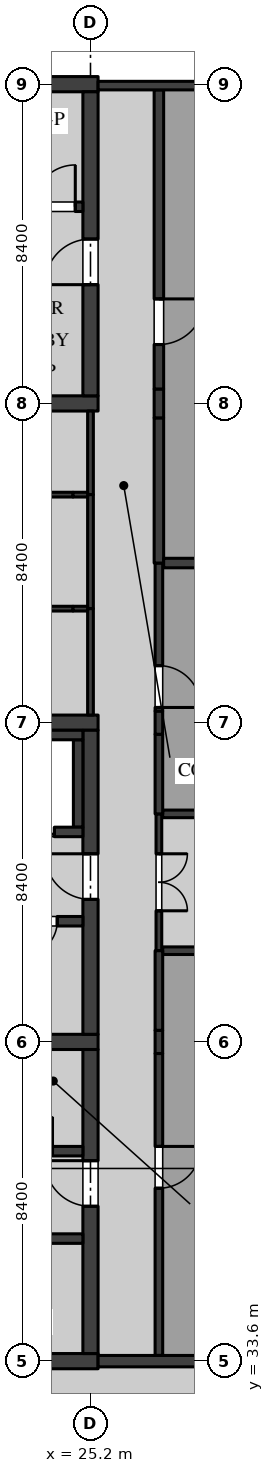
"""IFC4 building model, lengths in metres.
Left out: names, types, materials, properties, quantities, classifications, styles, units other than length and angle.
Written with IfcOpenShell. Run it as: python <this file> out.ifc"""

import sys

from ifc_helpers import new_model, si_unit, direction, frame, frame_2d, origin, place, context, subcontext, project, spatial, rectangle, extrude, element, fill, save


model = new_model("IFC4")
c1 = context("Model", 3, precision=1e-05, world=origin(), true_north=direction((0.0, 1.0)))
c2 = subcontext(c1, "Body", "Model", "MODEL_VIEW")
j1 = project(units=[si_unit("LENGTHUNIT", "METRE"), si_unit("PLANEANGLEUNIT", "RADIAN")], contexts=[c1])
p1 = place(None, origin())
s1 = spatial("IfcSite", under=j1, at=p1, CompositionType="ELEMENT")
p2 = place(p1, origin())
s2 = spatial("IfcBuilding", under=s1, at=p2, CompositionType="ELEMENT")
p3 = place(p2, frame((0.0, 0.0, 5.4)))
s3 = spatial("IfcBuildingStorey", under=s2, at=p3, CompositionType="ELEMENT", Elevation=5.4)
p4 = place(p3, frame((16.6, 42.0, 0.0), z_axis=(0.0, 0.0, 1.0), x_axis=(1.0, 0.0, 0.0)))
e1 = element("IfcWall", 1, at=p4, inside=s3, PredefinedType="SHEAR", context=c2, shape_type="SweptSolid", body=[
    extrude(rectangle(XDim=8.8, YDim=0.4, at=frame_2d((4.4, 0.0))), origin(), (0.0, 0.0, 1.0), 4.37),
])
p5 = place(p4, frame((1.05, 0.0, 0.0)))
e2 = element("IfcOpeningElement", 2, at=p5, cuts=e1, PredefinedType="OPENING", context=c2, shape_type="SweptSolid", body=[
    extrude(rectangle(XDim=1.1, YDim=2.1, at=frame_2d((0.55, 1.05))), frame((0.0, 0.21, 0.0), z_axis=(0.0, -1.0, 0.0), x_axis=(1.0, 0.0, 0.0)), (0.0, 0.0, 1.0), 0.42),
])
p6 = place(p3, frame((16.6, 50.4, 0.0), z_axis=(0.0, 0.0, 1.0), x_axis=(1.0, 0.0, 0.0)))
e3 = element("IfcWall", 3, at=p6, inside=s3, PredefinedType="SHEAR", context=c2, shape_type="SweptSolid", body=[
    extrude(rectangle(XDim=8.8, YDim=0.4, at=frame_2d((4.4, 0.0))), origin(), (0.0, 0.0, 1.0), 4.37),
])
p7 = place(p3, frame((25.2, 42.2, 0.0), z_axis=(0.0, 0.0, 1.0), x_axis=(0.0, 1.0, 0.0)))
e4 = element("IfcWall", 4, at=p7, inside=s3, PredefinedType="SHEAR", context=c2, shape_type="SweptSolid", body=[
    extrude(rectangle(XDim=8.0, YDim=0.4, at=frame_2d((4.0, 0.0))), origin(), (0.0, 0.0, 1.0), 4.37),
])
p8 = place(p7, frame((3.55, 0.0, 0.0)))
e5 = element("IfcOpeningElement", 5, at=p8, cuts=e4, PredefinedType="OPENING", context=c2, shape_type="SweptSolid", body=[
    extrude(rectangle(XDim=1.2, YDim=2.1, at=frame_2d((0.6, 1.05))), frame((0.0, 0.21, 0.0), z_axis=(0.0, -1.0, 0.0), x_axis=(1.0, 0.0, 0.0)), (0.0, 0.0, 1.0), 0.42),
])
p9 = place(p3, frame((25.0, 45.175, 0.0), z_axis=(0.0, 0.0, 1.0), x_axis=(-1.0, 0.0, 0.0)))
e6 = element("IfcWall", 6, at=p9, inside=s3, PredefinedType="SOLIDWALL", context=c2, shape_type="SweptSolid", body=[
    extrude(rectangle(XDim=2.25, YDim=0.25, at=frame_2d((1.125, 0.0))), origin(), (0.0, 0.0, 1.0), 4.37),
])
p10 = place(p9, frame((0.675, 0.0, 0.0)))
e7 = element("IfcOpeningElement", 7, at=p10, cuts=e6, PredefinedType="OPENING", context=c2, shape_type="SweptSolid", body=[
    extrude(rectangle(XDim=0.9, YDim=2.1, at=frame_2d((0.45, 1.05))), frame((0.0, 0.135, 0.0), z_axis=(0.0, -1.0, 0.0), x_axis=(1.0, 0.0, 0.0)), (0.0, 0.0, 1.0), 0.27),
])
for number, where, z_axis, x_axis in (
    (8, (16.6, 58.8, 0.0), (0.0, 0.0, 1.0), (1.0, 0.0, 0.0)),
    (9, (16.6, 67.2, 0.0), (0.0, 0.0, 1.0), (1.0, 0.0, 0.0)),
):
    element("IfcWall", number, at=place(p3, frame(where, z_axis=z_axis, x_axis=x_axis)), inside=s3, PredefinedType="SHEAR", context=c2, shape_type="SweptSolid", body=[
        extrude(rectangle(XDim=8.8, YDim=0.4, at=frame_2d((4.4, 0.0))), origin(), (0.0, 0.0, 1.0), 4.37),
    ])
p11 = place(p3, frame((25.2, 59.0, 0.0), z_axis=(0.0, 0.0, 1.0), x_axis=(0.0, 1.0, 0.0)))
e10 = element("IfcWall", 10, at=p11, inside=s3, PredefinedType="SHEAR", context=c2, shape_type="SweptSolid", body=[
    extrude(rectangle(XDim=8.0, YDim=0.4, at=frame_2d((4.0, 0.0))), origin(), (0.0, 0.0, 1.0), 4.37),
])
p12 = place(p11, frame((2.925, 0.0, 0.0)))
e11 = element("IfcOpeningElement", 11, at=p12, cuts=e10, PredefinedType="OPENING", context=c2, shape_type="SweptSolid", body=[
    extrude(rectangle(XDim=1.2, YDim=2.1, at=frame_2d((0.6, 1.05))), frame((0.0, 0.21, 0.0), z_axis=(0.0, -1.0, 0.0), x_axis=(1.0, 0.0, 0.0)), (0.0, 0.0, 1.0), 0.42),
])
p13 = place(p3, frame((25.0, 63.975, 0.0), z_axis=(0.0, 0.0, 1.0), x_axis=(-1.0, 0.0, 0.0)))
e12 = element("IfcWall", 12, at=p13, inside=s3, PredefinedType="SOLIDWALL", context=c2, shape_type="SweptSolid", body=[
    extrude(rectangle(XDim=8.0, YDim=0.25, at=frame_2d((4.0, 0.0))), origin(), (0.0, 0.0, 1.0), 4.37),
])
p14 = place(p13, frame((0.2, 0.0, 0.0)))
e13 = element("IfcOpeningElement", 13, at=p14, cuts=e12, PredefinedType="OPENING", context=c2, shape_type="SweptSolid", body=[
    extrude(rectangle(XDim=1.1, YDim=2.1, at=frame_2d((0.55, 1.05))), frame((0.0, 0.135, 0.0), z_axis=(0.0, -1.0, 0.0), x_axis=(1.0, 0.0, 0.0)), (0.0, 0.0, 1.0), 0.27),
])
p15 = place(p3, frame((16.6, 33.6, 0.0), z_axis=(0.0, 0.0, 1.0), x_axis=(1.0, 0.0, 0.0)))
e14 = element("IfcWall", 14, at=p15, inside=s3, PredefinedType="SHEAR", context=c2, shape_type="SweptSolid", body=[
    extrude(rectangle(XDim=8.8, YDim=0.4, at=frame_2d((4.4, 0.0))), origin(), (0.0, 0.0, 1.0), 4.37),
])
p16 = place(p3, frame((25.2, 33.8, 0.0), z_axis=(0.0, 0.0, 1.0), x_axis=(0.0, 1.0, 0.0)))
e15 = element("IfcWall", 15, at=p16, inside=s3, PredefinedType="SHEAR", context=c2, shape_type="SweptSolid", body=[
    extrude(rectangle(XDim=8.0, YDim=0.4, at=frame_2d((4.0, 0.0))), origin(), (0.0, 0.0, 1.0), 4.37),
])
p17 = place(p16, frame((3.875, 0.0, 0.0)))
e16 = element("IfcOpeningElement", 16, at=p17, cuts=e15, PredefinedType="OPENING", context=c2, shape_type="SweptSolid", body=[
    extrude(rectangle(XDim=1.2, YDim=2.1, at=frame_2d((0.6, 1.05))), frame((0.0, 0.21, 0.0), z_axis=(0.0, -1.0, 0.0), x_axis=(1.0, 0.0, 0.0)), (0.0, 0.0, 1.0), 0.42),
])
p18 = place(p3, frame((17.0, 36.825, 0.0), z_axis=(0.0, 0.0, 1.0), x_axis=(1.0, 0.0, 0.0)))
e17 = element("IfcWall", 17, at=p18, inside=s3, PredefinedType="SOLIDWALL", context=c2, shape_type="SweptSolid", body=[
    extrude(rectangle(XDim=8.0, YDim=0.25, at=frame_2d((4.0, 0.0))), origin(), (0.0, 0.0, 1.0), 4.37),
])
p19 = place(p18, frame((0.2, 0.0, 0.0)))
e18 = element("IfcOpeningElement", 18, at=p19, cuts=e17, PredefinedType="OPENING", context=c2, shape_type="SweptSolid", body=[
    extrude(rectangle(XDim=1.1, YDim=2.1, at=frame_2d((0.55, 1.05))), frame((0.0, 0.135, 0.0), z_axis=(0.0, -1.0, 0.0), x_axis=(1.0, 0.0, 0.0)), (0.0, 0.0, 1.0), 0.27),
])
p20 = place(p3, frame((19.65, 39.125, 0.0), z_axis=(0.0, 0.0, 1.0), x_axis=(1.0, 0.0, 0.0)))
e19 = element("IfcWall", 19, at=p20, inside=s3, PredefinedType="SOLIDWALL", context=c2, shape_type="SweptSolid", body=[
    extrude(rectangle(XDim=5.35, YDim=0.25, at=frame_2d((2.675, 0.0))), origin(), (0.0, 0.0, 1.0), 4.37),
])
p21 = place(p20, frame((3.65, 0.0, 0.0)))
e20 = element("IfcOpeningElement", 20, at=p21, cuts=e19, PredefinedType="OPENING", context=c2, shape_type="SweptSolid", body=[
    extrude(rectangle(XDim=0.9, YDim=2.1, at=frame_2d((0.45, 1.05))), frame((0.0, 0.135, 0.0), z_axis=(0.0, -1.0, 0.0), x_axis=(1.0, 0.0, 0.0)), (0.0, 0.0, 1.0), 0.27),
])
p22 = place(p20, frame((0.9, 0.0, 0.0)))
e21 = element("IfcOpeningElement", 21, at=p22, cuts=e19, PredefinedType="OPENING", context=c2, shape_type="SweptSolid", body=[
    extrude(rectangle(XDim=0.8, YDim=2.1, at=frame_2d((0.4, 1.05))), frame((0.0, 0.135, 0.0), z_axis=(0.0, -1.0, 0.0), x_axis=(1.0, 0.0, 0.0)), (0.0, 0.0, 1.0), 0.27),
])
p23 = place(p3, frame((24.875, 47.65, 0.0), z_axis=(0.0, 0.0, 1.0), x_axis=(0.0, 1.0, 0.0)))
e22 = element("IfcWall", 22, at=p23, inside=s3, PredefinedType="SOLIDWALL", context=c2, shape_type="SweptSolid", body=[
    extrude(rectangle(XDim=2.3, YDim=0.25, at=frame_2d((1.15, 0.0))), origin(), (0.0, 0.0, 1.0), 4.37),
])
p24 = place(p3, frame((21.7, 50.075, 0.0), z_axis=(0.0, 0.0, 1.0), x_axis=(1.0, 0.0, 0.0)))
e23 = element("IfcWall", 23, at=p24, inside=s3, PredefinedType="SOLIDWALL", context=c2, shape_type="SweptSolid", body=[
    extrude(rectangle(XDim=3.3, YDim=0.25, at=frame_2d((1.65, 0.0))), origin(), (0.0, 0.0, 1.0), 4.37),
])
p25 = place(p3, frame((21.7, 47.525, 0.0), z_axis=(0.0, 0.0, 1.0), x_axis=(1.0, 0.0, 0.0)))
e24 = element("IfcWall", 24, at=p25, inside=s3, PredefinedType="SOLIDWALL", context=c2, shape_type="SweptSolid", body=[
    extrude(rectangle(XDim=3.3, YDim=0.25, at=frame_2d((1.65, 0.0))), origin(), (0.0, 0.0, 1.0), 4.37),
])
p26 = place(p25, frame((0.75, 0.0, 0.0)))
e25 = element("IfcOpeningElement", 25, at=p26, cuts=e24, PredefinedType="OPENING", context=c2, shape_type="SweptSolid", body=[
    extrude(rectangle(XDim=1.8, YDim=2.1, at=frame_2d((0.9, 1.05))), frame((0.0, 0.135, 0.0), z_axis=(0.0, -1.0, 0.0), x_axis=(1.0, 0.0, 0.0)), (0.0, 0.0, 1.0), 0.27),
])
p27 = place(p3, frame((27.0, 44.4, 0.0), z_axis=(0.0, 0.0, 1.0), x_axis=(0.0, 1.0, 0.0)))
e26 = element("IfcWall", 26, at=p27, inside=s3, PredefinedType="PARTITIONING", context=c2, shape_type="SweptSolid", body=[
    extrude(rectangle(XDim=3.6, YDim=0.15, at=frame_2d((1.8, 0.0))), origin(), (0.0, 0.0, 1.0), 4.37),
])
p28 = place(p27, frame((1.05, 0.0, 0.0)))
e27 = element("IfcOpeningElement", 27, at=p28, cuts=e26, PredefinedType="OPENING", context=c2, shape_type="SweptSolid", body=[
    extrude(rectangle(XDim=1.5, YDim=2.1, at=frame_2d((0.75, 1.05))), frame((0.0, 0.085, 0.0), z_axis=(0.0, -1.0, 0.0), x_axis=(1.0, 0.0, 0.0)), (0.0, 0.0, 1.0), 0.17),
])
for number, where, z_axis, x_axis in (
    (28, (27.1, 44.4, 0.0), (0.0, 0.0, 1.0), (1.0, 0.0, 0.0)),
    (29, (27.1, 48.0, 0.0), (0.0, 0.0, 1.0), (1.0, 0.0, 0.0)),
):
    element("IfcWall", number, at=place(p3, frame(where, z_axis=z_axis, x_axis=x_axis)), inside=s3, PredefinedType="PARTITIONING", context=c2, shape_type="SweptSolid", body=[
        extrude(rectangle(XDim=1.205, YDim=0.2, at=frame_2d((0.603, 0.0))), origin(), (0.0, 0.0, 1.0), 3.895),
    ])
p29 = place(p3, frame((27.0, 33.75, 0.0), z_axis=(0.0, 0.0, 1.0), x_axis=(0.0, 1.0, 0.0)))
e30 = element("IfcWall", 30, at=p29, inside=s3, PredefinedType="PARTITIONING", context=c2, shape_type="SweptSolid", body=[
    extrude(rectangle(XDim=7.945, YDim=0.2, at=frame_2d((3.973, 0.0))), origin(), (0.0, 0.0, 1.0), 4.37),
])
p30 = place(p29, frame((4.4, 0.0, 0.0)))
e31 = element("IfcOpeningElement", 31, at=p30, cuts=e30, PredefinedType="OPENING", context=c2, shape_type="SweptSolid", body=[
    extrude(rectangle(XDim=1.1, YDim=2.1, at=frame_2d((0.55, 1.05))), frame((0.0, 0.11, 0.0), z_axis=(0.0, -1.0, 0.0), x_axis=(1.0, 0.0, 0.0)), (0.0, 0.0, 1.0), 0.22),
])
p31 = place(p3, frame((27.0, 41.695, 0.0), z_axis=(0.0, 0.0, 1.0), x_axis=(0.0, 1.0, 0.0)))
e32 = element("IfcWall", 32, at=p31, inside=s3, PredefinedType="PARTITIONING", context=c2, shape_type="SweptSolid", body=[
    extrude(rectangle(XDim=0.61, YDim=0.2, at=frame_2d((0.305, 0.0))), origin(), (0.0, 0.0, 1.0), 3.746),
])
for number, where, z_axis, x_axis in (
    (33, (27.0, 42.305, 0.0), (0.0, 0.0, 1.0), (0.0, 1.0, 0.0)),
    (34, (27.0, 48.0, 0.0), (0.0, 0.0, 1.0), (0.0, 1.0, 0.0)),
):
    element("IfcWall", number, at=place(p3, frame(where, z_axis=z_axis, x_axis=x_axis)), inside=s3, PredefinedType="PARTITIONING", context=c2, shape_type="SweptSolid", body=[
        extrude(rectangle(XDim=2.095, YDim=0.2, at=frame_2d((1.047, 0.0))), origin(), (0.0, 0.0, 1.0), 4.37),
    ])
p32 = place(p3, frame((27.0, 50.095, 0.0), z_axis=(0.0, 0.0, 1.0), x_axis=(0.0, 1.0, 0.0)))
e35 = element("IfcWall", 35, at=p32, inside=s3, PredefinedType="PARTITIONING", context=c2, shape_type="SweptSolid", body=[
    extrude(rectangle(XDim=0.61, YDim=0.2, at=frame_2d((0.305, 0.0))), origin(), (0.0, 0.0, 1.0), 3.746),
])
p33 = place(p3, frame((27.0, 50.705, 0.0), z_axis=(0.0, 0.0, 1.0), x_axis=(0.0, 1.0, 0.0)))
e36 = element("IfcWall", 36, at=p33, inside=s3, PredefinedType="PARTITIONING", context=c2, shape_type="SweptSolid", body=[
    extrude(rectangle(XDim=3.895, YDim=0.2, at=frame_2d((1.948, 0.0))), origin(), (0.0, 0.0, 1.0), 4.37),
])
p34 = place(p33, frame((0.095, 0.0, 0.0)))
e37 = element("IfcOpeningElement", 37, at=p34, cuts=e36, PredefinedType="OPENING", context=c2, shape_type="SweptSolid", body=[
    extrude(rectangle(XDim=1.1, YDim=2.1, at=frame_2d((0.55, 1.05))), frame((0.0, 0.11, 0.0), z_axis=(0.0, -1.0, 0.0), x_axis=(1.0, 0.0, 0.0)), (0.0, 0.0, 1.0), 0.22),
])
p35 = place(p3, frame((27.0, 54.6, 0.0), z_axis=(0.0, 0.0, 1.0), x_axis=(0.0, 1.0, 0.0)))
e38 = element("IfcWall", 38, at=p35, inside=s3, PredefinedType="PARTITIONING", context=c2, shape_type="SweptSolid", body=[
    extrude(rectangle(XDim=3.82, YDim=0.25, at=frame_2d((1.91, 0.0))), origin(), (0.0, 0.0, 1.0), 4.37),
])
p36 = place(p3, frame((27.0, 58.42, 0.0), z_axis=(0.0, 0.0, 1.0), x_axis=(0.0, 1.0, 0.0)))
e39 = element("IfcWall", 39, at=p36, inside=s3, PredefinedType="PARTITIONING", context=c2, shape_type="SweptSolid", body=[
    extrude(rectangle(XDim=0.76, YDim=0.25, at=frame_2d((0.38, 0.0))), origin(), (0.0, 0.0, 1.0), 3.746),
])
p37 = place(p3, frame((27.0, 59.18, 0.0), z_axis=(0.0, 0.0, 1.0), x_axis=(0.0, 1.0, 0.0)))
e40 = element("IfcWall", 40, at=p37, inside=s3, PredefinedType="PARTITIONING", context=c2, shape_type="SweptSolid", body=[
    extrude(rectangle(XDim=7.87, YDim=0.25, at=frame_2d((3.935, 0.0))), origin(), (0.0, 0.0, 1.0), 4.37),
])
p38 = place(p37, frame((1.17, 0.0, 0.0)))
e41 = element("IfcOpeningElement", 41, at=p38, cuts=e40, PredefinedType="OPENING", context=c2, shape_type="SweptSolid", body=[
    extrude(rectangle(XDim=1.2, YDim=2.4, at=frame_2d((0.6, 1.2))), frame((0.0, 0.135, 0.0), z_axis=(0.0, -1.0, 0.0), x_axis=(1.0, 0.0, 0.0)), (0.0, 0.0, 1.0), 0.27),
])
p39 = place(p3, frame((25.2, 56.4, 0.0), z_axis=(0.0, 0.0, 1.0), x_axis=(0.0, 1.0, 0.0)))
e42 = element("IfcWall", 42, at=p39, inside=s3, PredefinedType="PARTITIONING", context=c2, shape_type="SweptSolid", body=[
    extrude(rectangle(XDim=2.2, YDim=0.15, at=frame_2d((1.1, 0.0))), origin(), (0.0, 0.0, 1.0), 3.746),
])
p40 = place(p3, frame((25.2, 53.4, 0.0), z_axis=(0.0, 0.0, 1.0), x_axis=(0.0, 1.0, 0.0)))
e43 = element("IfcWall", 43, at=p40, inside=s3, PredefinedType="PARTITIONING", context=c2, shape_type="SweptSolid", body=[
    extrude(rectangle(XDim=3.0, YDim=0.15, at=frame_2d((1.5, 0.0))), origin(), (0.0, 0.0, 1.0), 3.746),
])
p41 = place(p3, frame((25.2, 50.6, 0.0), z_axis=(0.0, 0.0, 1.0), x_axis=(0.0, 1.0, 0.0)))
e44 = element("IfcWall", 44, at=p41, inside=s3, PredefinedType="PARTITIONING", context=c2, shape_type="SweptSolid", body=[
    extrude(rectangle(XDim=2.8, YDim=0.15, at=frame_2d((1.4, 0.0))), origin(), (0.0, 0.0, 1.0), 3.746),
])
p42 = place(p3, frame((27.125, 54.6, 0.0), z_axis=(0.0, 0.0, 1.0), x_axis=(1.0, 0.0, 0.0)))
e45 = element("IfcWall", 45, at=p42, inside=s3, PredefinedType="PARTITIONING", context=c2, shape_type="SweptSolid", body=[
    extrude(rectangle(XDim=1.255, YDim=0.25, at=frame_2d((0.627, 0.0))), origin(), (0.0, 0.0, 1.0), 3.895),
])
p43 = place(p3, frame((22.592, 56.4, 0.0), z_axis=(0.0, 0.0, 1.0), x_axis=(1.0, 0.0, 0.0)))
e46 = element("IfcWall", 46, at=p43, inside=s3, PredefinedType="PARTITIONING", context=c2, shape_type="SweptSolid", body=[
    extrude(rectangle(XDim=2.148, YDim=0.125, at=frame_2d((1.074, 0.0))), origin(), (0.0, 0.0, 1.0), 4.37),
])
p44 = place(p3, frame((24.74, 56.4, 0.0), z_axis=(0.0, 0.0, 1.0), x_axis=(1.0, 0.0, 0.0)))
e47 = element("IfcWall", 47, at=p44, inside=s3, PredefinedType="PARTITIONING", context=c2, shape_type="SweptSolid", body=[
    extrude(rectangle(XDim=0.385, YDim=0.125, at=frame_2d((0.192, 0.0))), origin(), (0.0, 0.0, 1.0), 3.746),
])
p45 = place(p3, frame((22.592, 53.4, 0.0), z_axis=(0.0, 0.0, 1.0), x_axis=(1.0, 0.0, 0.0)))
e48 = element("IfcWall", 48, at=p45, inside=s3, PredefinedType="PARTITIONING", context=c2, shape_type="SweptSolid", body=[
    extrude(rectangle(XDim=2.148, YDim=0.125, at=frame_2d((1.074, 0.0))), origin(), (0.0, 0.0, 1.0), 4.37),
])
p46 = place(p3, frame((24.74, 53.4, 0.0), z_axis=(0.0, 0.0, 1.0), x_axis=(1.0, 0.0, 0.0)))
e49 = element("IfcWall", 49, at=p46, inside=s3, PredefinedType="PARTITIONING", context=c2, shape_type="SweptSolid", body=[
    extrude(rectangle(XDim=0.385, YDim=0.125, at=frame_2d((0.192, 0.0))), origin(), (0.0, 0.0, 1.0), 3.746),
])
p47 = place(p3, frame((33.22, 67.163, 0.0), z_axis=(0.0, 0.0, 1.0), x_axis=(-1.0, 0.0, 0.0)))
e50 = element("IfcWall", 50, at=p47, inside=s3, PredefinedType="SOLIDWALL", context=c2, shape_type="SweptSolid", body=[
    extrude(rectangle(XDim=7.82, YDim=0.225, at=frame_2d((3.91, 0.0))), origin(), (0.0, 0.0, 1.0), 3.746),
])
p48 = place(p3, frame((33.22, 33.6, 0.0), z_axis=(0.0, 0.0, 1.0), x_axis=(-1.0, 0.0, 0.0)))
e51 = element("IfcWall", 51, at=p48, inside=s3, PredefinedType="SOLIDWALL", context=c2, shape_type="SweptSolid", body=[
    extrude(rectangle(XDim=7.82, YDim=0.3, at=frame_2d((3.91, 0.0))), origin(), (0.0, 0.0, 1.0), 3.746),
])
p49 = place(p8, origin())
e52 = element("IfcDoor", 52, at=p49, inside=s3, OperationType="SINGLE_SWING_LEFT", PredefinedType="DOOR", context=c2, shape_type="SweptSolid", body=[
    extrude(rectangle(XDim=1.2, YDim=2.1, at=frame_2d((0.6, 1.05))), frame((0.0, 0.035, 0.0), z_axis=(0.0, -1.0, 0.0), x_axis=(1.0, 0.0, 0.0)), (0.0, 0.0, 1.0), 0.07),
])
fill(e5, e52)
p50 = place(p10, origin())
e53 = element("IfcDoor", 53, at=p50, inside=s3, OperationType="SINGLE_SWING_LEFT", PredefinedType="DOOR", context=c2, shape_type="SweptSolid", body=[
    extrude(rectangle(XDim=0.9, YDim=2.1, at=frame_2d((0.45, 1.05))), frame((0.0, 0.05, 0.0), z_axis=(0.0, -1.0, 0.0), x_axis=(1.0, 0.0, 0.0)), (0.0, 0.0, 1.0), 0.1),
])
fill(e7, e53)
p51 = place(p12, origin())
e54 = element("IfcDoor", 54, at=p51, inside=s3, OperationType="SINGLE_SWING_RIGHT", PredefinedType="DOOR", context=c2, shape_type="SweptSolid", body=[
    extrude(rectangle(XDim=1.2, YDim=2.1, at=frame_2d((0.6, 1.05))), frame((0.0, 0.035, 0.0), z_axis=(0.0, -1.0, 0.0), x_axis=(1.0, 0.0, 0.0)), (0.0, 0.0, 1.0), 0.07),
])
fill(e11, e54)
p52 = place(p14, frame((1.1, 0.0, 0.0), z_axis=(0.0, 0.0, 1.0), x_axis=(-1.0, 0.0, 0.0)))
e55 = element("IfcDoor", 55, at=p52, inside=s3, OperationType="SINGLE_SWING_LEFT", PredefinedType="DOOR", context=c2, shape_type="SweptSolid", body=[
    extrude(rectangle(XDim=1.1, YDim=2.1, at=frame_2d((0.55, 1.05))), frame((0.0, 0.035, 0.0), z_axis=(0.0, -1.0, 0.0), x_axis=(1.0, 0.0, 0.0)), (0.0, 0.0, 1.0), 0.07),
])
fill(e13, e55)
p53 = place(p17, origin())
e56 = element("IfcDoor", 56, at=p53, inside=s3, OperationType="SINGLE_SWING_LEFT", PredefinedType="DOOR", context=c2, shape_type="SweptSolid", body=[
    extrude(rectangle(XDim=1.2, YDim=2.1, at=frame_2d((0.6, 1.05))), frame((0.0, 0.035, 0.0), z_axis=(0.0, -1.0, 0.0), x_axis=(1.0, 0.0, 0.0)), (0.0, 0.0, 1.0), 0.07),
])
fill(e16, e56)
p54 = place(p26, origin())
e57 = element("IfcDoor", 57, at=p54, inside=s3, OperationType="DOUBLE_DOOR_SLIDING", PredefinedType="DOOR", context=c2, shape_type="SweptSolid", body=[
    extrude(rectangle(XDim=1.8, YDim=2.1, at=frame_2d((0.9, 1.05))), frame((0.0, 0.04, 0.0), z_axis=(0.0, -1.0, 0.0), x_axis=(1.0, 0.0, 0.0)), (0.0, 0.0, 1.0), 0.08),
])
fill(e25, e57)
p55 = place(p28, frame((1.5, 0.0, 0.0), z_axis=(0.0, 0.0, 1.0), x_axis=(-1.0, 0.0, 0.0)))
e58 = element("IfcDoor", 58, at=p55, inside=s3, OperationType="DOUBLE_DOOR_SINGLE_SWING", PredefinedType="DOOR", context=c2, shape_type="SweptSolid", body=[
    extrude(rectangle(XDim=1.5, YDim=2.1, at=frame_2d((0.75, 1.05))), frame((0.0, 0.025, 0.0), z_axis=(0.0, -1.0, 0.0), x_axis=(1.0, 0.0, 0.0)), (0.0, 0.0, 1.0), 0.05),
])
fill(e27, e58)
p56 = place(p30, frame((1.1, 0.0, 0.0), z_axis=(0.0, 0.0, 1.0), x_axis=(-1.0, 0.0, 0.0)))
e59 = element("IfcDoor", 59, at=p56, inside=s3, OperationType="SINGLE_SWING_RIGHT", PredefinedType="DOOR", context=c2, shape_type="SweptSolid", body=[
    extrude(rectangle(XDim=1.1, YDim=2.1, at=frame_2d((0.55, 1.05))), frame((0.0, 0.025, 0.0), z_axis=(0.0, -1.0, 0.0), x_axis=(1.0, 0.0, 0.0)), (0.0, 0.0, 1.0), 0.05),
])
fill(e31, e59)
p57 = place(p34, frame((1.1, 0.0, 0.0), z_axis=(0.0, 0.0, 1.0), x_axis=(-1.0, 0.0, 0.0)))
e60 = element("IfcDoor", 60, at=p57, inside=s3, OperationType="SINGLE_SWING_LEFT", PredefinedType="DOOR", context=c2, shape_type="SweptSolid", body=[
    extrude(rectangle(XDim=1.1, YDim=2.1, at=frame_2d((0.55, 1.05))), frame((0.0, 0.025, 0.0), z_axis=(0.0, -1.0, 0.0), x_axis=(1.0, 0.0, 0.0)), (0.0, 0.0, 1.0), 0.05),
])
fill(e37, e60)
p58 = place(p38, frame((1.2, 0.0, 0.0), z_axis=(0.0, 0.0, 1.0), x_axis=(-1.0, 0.0, 0.0)))
e61 = element("IfcDoor", 61, at=p58, inside=s3, OperationType="SINGLE_SWING_RIGHT", PredefinedType="DOOR", context=c2, shape_type="SweptSolid", body=[
    extrude(rectangle(XDim=1.2, YDim=2.4, at=frame_2d((0.6, 1.2))), frame((0.0, 0.05, 0.0), z_axis=(0.0, -1.0, 0.0), x_axis=(1.0, 0.0, 0.0)), (0.0, 0.0, 1.0), 0.1),
])
fill(e41, e61)
save(model, sys.argv[1])
